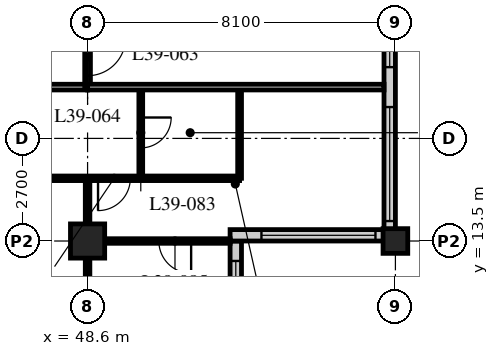
"""IFC4 building model, lengths in metres.
Left out: names, types, materials, properties, quantities, classifications, styles, units other than length and angle.
Written with IfcOpenShell. Run it as: python <this file> out.ifc"""

import sys

from ifc_helpers import new_model, si_unit, direction, frame, frame_2d, origin, origin_2d, place, context, subcontext, project, spatial, rectangle, hollow_rectangle, extrude, element, fill, save


model = new_model("IFC4")
c1 = context("Model", 3, precision=1e-05, world=origin(), true_north=direction((0.0, 1.0)))
c2 = subcontext(c1, "Body", "Model", "MODEL_VIEW")
j1 = project(units=[si_unit("LENGTHUNIT", "METRE"), si_unit("PLANEANGLEUNIT", "RADIAN")], contexts=[c1])
p1 = place(None, origin())
s1 = spatial("IfcSite", under=j1, at=p1, CompositionType="ELEMENT")
p2 = place(p1, origin())
s2 = spatial("IfcBuilding", under=s1, at=p2, CompositionType="ELEMENT")
p3 = place(p2, frame((0.0, 0.0, 151.0)))
s3 = spatial("IfcBuildingStorey", under=s2, at=p3, CompositionType="ELEMENT", Elevation=151.0)
p4 = place(p3, frame((48.6, 13.5, 0.0), z_axis=(0.0, 0.0, 1.0), x_axis=(1.0, 0.0, 0.0)))
e1 = element("IfcColumn", 1, at=p4, inside=s3, PredefinedType="COLUMN", context=c2, shape_type="SweptSolid", body=[
    extrude(hollow_rectangle(XDim=0.9, YDim=0.9, WallThickness=0.1, at=origin_2d()), origin(), (0.0, 0.0, 1.0), 3.4),
])
p5 = place(p3, frame((56.7, 13.5, 0.0), z_axis=(0.0, 0.0, 1.0), x_axis=(1.0, 0.0, 0.0)))
e2 = element("IfcColumn", 2, at=p5, inside=s3, PredefinedType="COLUMN", context=c2, shape_type="SweptSolid", body=[
    extrude(hollow_rectangle(XDim=0.65, YDim=0.65, WallThickness=0.055, at=origin_2d()), origin(), (0.0, 0.0, 1.0), 3.4),
])
p6 = place(p3, frame((52.5, 9.75, 0.0), z_axis=(0.0, 0.0, 1.0), x_axis=(0.0, 1.0, 0.0)))
e3 = element("IfcWall", 3, at=p6, inside=s3, PredefinedType="SOLIDWALL", context=c2, shape_type="SweptSolid", body=[
    extrude(rectangle(XDim=3.75, YDim=0.3, at=frame_2d((1.875, 0.0))), origin(), (0.0, 0.0, 1.0), 3.19),
])
p7 = place(p6, frame((0.225, 0.0, 0.9)))
e4 = element("IfcOpeningElement", 4, at=p7, cuts=e3, PredefinedType="OPENING", context=c2, shape_type="SweptSolid", body=[
    extrude(rectangle(XDim=3.0, YDim=1.4, at=frame_2d((1.5, 0.7))), frame((0.0, 0.16, 0.0), z_axis=(0.0, -1.0, 0.0), x_axis=(1.0, 0.0, 0.0)), (0.0, 0.0, 1.0), 0.32),
])
p8 = place(p3, frame((52.35, 13.65, 0.0), z_axis=(0.0, 0.0, 1.0), x_axis=(1.0, 0.0, 0.0)))
e5 = element("IfcWall", 5, at=p8, inside=s3, PredefinedType="SOLIDWALL", context=c2, shape_type="SweptSolid", body=[
    extrude(rectangle(XDim=4.35, YDim=0.3, at=frame_2d((2.175, 0.0))), origin(), (0.0, 0.0, 1.0), 3.19),
])
p9 = place(p8, frame((0.825, 0.0, 0.9)))
e6 = element("IfcOpeningElement", 6, at=p9, cuts=e5, PredefinedType="OPENING", context=c2, shape_type="SweptSolid", body=[
    extrude(rectangle(XDim=3.0, YDim=1.4, at=frame_2d((1.5, 0.7))), frame((0.0, 0.16, 0.0), z_axis=(0.0, -1.0, 0.0), x_axis=(1.0, 0.0, 0.0)), (0.0, 0.0, 1.0), 0.32),
])
p10 = place(p3, frame((56.55, 13.8, 0.0), z_axis=(0.0, 0.0, 1.0), x_axis=(0.0, 1.0, 0.0)))
e7 = element("IfcWall", 7, at=p10, inside=s3, PredefinedType="SOLIDWALL", context=c2, shape_type="SweptSolid", body=[
    extrude(rectangle(XDim=32.1, YDim=0.3, at=frame_2d((16.05, 0.0))), origin(), (0.0, 0.0, 1.0), 3.19),
])
p11 = place(p10, frame((0.225, 0.0, 0.9)))
e8 = element("IfcOpeningElement", 8, at=p11, cuts=e7, PredefinedType="OPENING", context=c2, shape_type="SweptSolid", body=[
    extrude(rectangle(XDim=3.0, YDim=1.4, at=frame_2d((1.5, 0.7))), frame((0.0, 0.16, 0.0), z_axis=(0.0, -1.0, 0.0), x_axis=(1.0, 0.0, 0.0)), (0.0, 0.0, 1.0), 0.32),
])
p12 = place(p10, frame((4.275, 0.0, 0.9)))
e9 = element("IfcOpeningElement", 9, at=p12, cuts=e7, PredefinedType="OPENING", context=c2, shape_type="SweptSolid", body=[
    extrude(rectangle(XDim=3.0, YDim=1.4, at=frame_2d((1.5, 0.7))), frame((0.0, 0.16, 0.0), z_axis=(0.0, -1.0, 0.0), x_axis=(1.0, 0.0, 0.0)), (0.0, 0.0, 1.0), 0.32),
])
p13 = place(p10, frame((8.325, 0.0, 0.9)))
e10 = element("IfcOpeningElement", 10, at=p13, cuts=e7, PredefinedType="OPENING", context=c2, shape_type="SweptSolid", body=[
    extrude(rectangle(XDim=3.0, YDim=1.4, at=frame_2d((1.5, 0.7))), frame((0.0, 0.16, 0.0), z_axis=(0.0, -1.0, 0.0), x_axis=(1.0, 0.0, 0.0)), (0.0, 0.0, 1.0), 0.32),
])
p14 = place(p10, frame((12.375, 0.0, 0.9)))
e11 = element("IfcOpeningElement", 11, at=p14, cuts=e7, PredefinedType="OPENING", context=c2, shape_type="SweptSolid", body=[
    extrude(rectangle(XDim=3.0, YDim=1.4, at=frame_2d((1.5, 0.7))), frame((0.0, 0.16, 0.0), z_axis=(0.0, -1.0, 0.0), x_axis=(1.0, 0.0, 0.0)), (0.0, 0.0, 1.0), 0.32),
])
p15 = place(p10, frame((16.425, 0.0, 0.9)))
e12 = element("IfcOpeningElement", 12, at=p15, cuts=e7, PredefinedType="OPENING", context=c2, shape_type="SweptSolid", body=[
    extrude(rectangle(XDim=3.0, YDim=1.4, at=frame_2d((1.5, 0.7))), frame((0.0, 0.16, 0.0), z_axis=(0.0, -1.0, 0.0), x_axis=(1.0, 0.0, 0.0)), (0.0, 0.0, 1.0), 0.32),
])
p16 = place(p10, frame((20.475, 0.0, 0.9)))
e13 = element("IfcOpeningElement", 13, at=p16, cuts=e7, PredefinedType="OPENING", context=c2, shape_type="SweptSolid", body=[
    extrude(rectangle(XDim=3.0, YDim=1.4, at=frame_2d((1.5, 0.7))), frame((0.0, 0.16, 0.0), z_axis=(0.0, -1.0, 0.0), x_axis=(1.0, 0.0, 0.0)), (0.0, 0.0, 1.0), 0.32),
])
p17 = place(p10, frame((24.525, 0.0, 0.9)))
e14 = element("IfcOpeningElement", 14, at=p17, cuts=e7, PredefinedType="OPENING", context=c2, shape_type="SweptSolid", body=[
    extrude(rectangle(XDim=3.0, YDim=1.4, at=frame_2d((1.5, 0.7))), frame((0.0, 0.16, 0.0), z_axis=(0.0, -1.0, 0.0), x_axis=(1.0, 0.0, 0.0)), (0.0, 0.0, 1.0), 0.32),
])
p18 = place(p10, frame((28.575, 0.0, 0.9)))
e15 = element("IfcOpeningElement", 15, at=p18, cuts=e7, PredefinedType="OPENING", context=c2, shape_type="SweptSolid", body=[
    extrude(rectangle(XDim=3.0, YDim=1.4, at=frame_2d((1.5, 0.7))), frame((0.0, 0.16, 0.0), z_axis=(0.0, -1.0, 0.0), x_axis=(1.0, 0.0, 0.0)), (0.0, 0.0, 1.0), 0.32),
])
p19 = place(p3, frame((8.1, 17.55, 0.0), z_axis=(0.0, 0.0, 1.0), x_axis=(1.0, 0.0, 0.0)))
e16 = element("IfcWall", 16, at=p19, inside=s3, PredefinedType="PARTITIONING", context=c2, shape_type="SweptSolid", body=[
    extrude(rectangle(XDim=40.5, YDim=0.15, at=frame_2d((20.25, 0.0))), origin(), (0.0, 0.0, 1.0), 3.19),
])
p20 = place(p19, frame((10.0, 0.0, 0.0)))
e17 = element("IfcOpeningElement", 17, at=p20, cuts=e16, PredefinedType="OPENING", context=c2, shape_type="SweptSolid", body=[
    extrude(rectangle(XDim=1.0, YDim=2.1, at=frame_2d((0.5, 1.05))), frame((0.0, 0.085, 0.0), z_axis=(0.0, -1.0, 0.0), x_axis=(1.0, 0.0, 0.0)), (0.0, 0.0, 1.0), 0.17),
])
p21 = place(p19, frame((22.15, 0.0, 0.0)))
e18 = element("IfcOpeningElement", 18, at=p21, cuts=e16, PredefinedType="OPENING", context=c2, shape_type="SweptSolid", body=[
    extrude(rectangle(XDim=1.0, YDim=2.1, at=frame_2d((0.5, 1.05))), frame((0.0, 0.085, 0.0), z_axis=(0.0, -1.0, 0.0), x_axis=(1.0, 0.0, 0.0)), (0.0, 0.0, 1.0), 0.17),
])
p22 = place(p19, frame((30.8, 0.0, 0.0)))
e19 = element("IfcOpeningElement", 19, at=p22, cuts=e16, PredefinedType="OPENING", context=c2, shape_type="SweptSolid", body=[
    extrude(rectangle(XDim=1.0, YDim=2.1, at=frame_2d((0.5, 1.05))), frame((0.0, 0.085, 0.0), z_axis=(0.0, -1.0, 0.0), x_axis=(1.0, 0.0, 0.0)), (0.0, 0.0, 1.0), 0.17),
])
p23 = place(p19, frame((34.85, 0.0, 0.0)))
e20 = element("IfcOpeningElement", 20, at=p23, cuts=e16, PredefinedType="OPENING", context=c2, shape_type="SweptSolid", body=[
    extrude(rectangle(XDim=1.0, YDim=2.1, at=frame_2d((0.5, 1.05))), frame((0.0, 0.085, 0.0), z_axis=(0.0, -1.0, 0.0), x_axis=(1.0, 0.0, 0.0)), (0.0, 0.0, 1.0), 0.17),
])
p24 = place(p19, frame((1.525, 0.0, 0.0)))
e21 = element("IfcOpeningElement", 21, at=p24, cuts=e16, PredefinedType="OPENING", context=c2, shape_type="SweptSolid", body=[
    extrude(rectangle(XDim=1.0, YDim=2.1, at=frame_2d((0.5, 1.05))), frame((0.0, 0.085, 0.0), z_axis=(0.0, -1.0, 0.0), x_axis=(1.0, 0.0, 0.0)), (0.0, 0.0, 1.0), 0.17),
])
p25 = place(p19, frame((37.975, 0.0, 0.0)))
e22 = element("IfcOpeningElement", 22, at=p25, cuts=e16, PredefinedType="OPENING", context=c2, shape_type="SweptSolid", body=[
    extrude(rectangle(XDim=1.0, YDim=2.1, at=frame_2d((0.5, 1.05))), frame((0.0, 0.085, 0.0), z_axis=(0.0, -1.0, 0.0), x_axis=(1.0, 0.0, 0.0)), (0.0, 0.0, 1.0), 0.17),
])
p26 = place(p3, frame((48.6, 17.55, 0.0), z_axis=(0.0, 0.0, 1.0), x_axis=(0.0, 1.0, 0.0)))
e23 = element("IfcWall", 23, at=p26, inside=s3, PredefinedType="PARTITIONING", context=c2, shape_type="SweptSolid", body=[
    extrude(rectangle(XDim=28.35, YDim=0.15, at=frame_2d((14.175, 0.0))), origin(), (0.0, 0.0, 1.0), 2.42),
])
p27 = place(p26, frame((0.3, 0.0, 0.0)))
e24 = element("IfcOpeningElement", 24, at=p27, cuts=e23, PredefinedType="OPENING", context=c2, shape_type="SweptSolid", body=[
    extrude(rectangle(XDim=1.0, YDim=2.1, at=frame_2d((0.5, 1.05))), frame((0.0, 0.085, 0.0), z_axis=(0.0, -1.0, 0.0), x_axis=(1.0, 0.0, 0.0)), (0.0, 0.0, 1.0), 0.17),
])
p28 = place(p26, frame((6.5, 0.0, 0.0)))
e25 = element("IfcOpeningElement", 25, at=p28, cuts=e23, PredefinedType="OPENING", context=c2, shape_type="SweptSolid", body=[
    extrude(rectangle(XDim=1.0, YDim=2.1, at=frame_2d((0.5, 1.05))), frame((0.0, 0.085, 0.0), z_axis=(0.0, -1.0, 0.0), x_axis=(1.0, 0.0, 0.0)), (0.0, 0.0, 1.0), 0.17),
])
p29 = place(p26, frame((13.675, 0.0, 0.0)))
e26 = element("IfcOpeningElement", 26, at=p29, cuts=e23, PredefinedType="OPENING", context=c2, shape_type="SweptSolid", body=[
    extrude(rectangle(XDim=1.0, YDim=2.1, at=frame_2d((0.5, 1.05))), frame((0.0, 0.085, 0.0), z_axis=(0.0, -1.0, 0.0), x_axis=(1.0, 0.0, 0.0)), (0.0, 0.0, 1.0), 0.17),
])
p30 = place(p26, frame((22.7, 0.0, 0.0)))
e27 = element("IfcOpeningElement", 27, at=p30, cuts=e23, PredefinedType="OPENING", context=c2, shape_type="SweptSolid", body=[
    extrude(rectangle(XDim=1.0, YDim=2.1, at=frame_2d((0.5, 1.05))), frame((0.0, 0.085, 0.0), z_axis=(0.0, -1.0, 0.0), x_axis=(1.0, 0.0, 0.0)), (0.0, 0.0, 1.0), 0.17),
])
p31 = place(p26, frame((24.9, 0.0, 0.0)))
e28 = element("IfcOpeningElement", 28, at=p31, cuts=e23, PredefinedType="OPENING", context=c2, shape_type="SweptSolid", body=[
    extrude(rectangle(XDim=1.0, YDim=2.1, at=frame_2d((0.5, 1.05))), frame((0.0, 0.085, 0.0), z_axis=(0.0, -1.0, 0.0), x_axis=(1.0, 0.0, 0.0)), (0.0, 0.0, 1.0), 0.17),
])
p32 = place(p3, frame((44.55, 15.15, 0.0), z_axis=(0.0, 0.0, 1.0), x_axis=(1.0, 0.0, 0.0)))
e29 = element("IfcWall", 29, at=p32, inside=s3, PredefinedType="PARTITIONING", context=c2, shape_type="SweptSolid", body=[
    extrude(rectangle(XDim=8.05, YDim=0.12, at=frame_2d((4.025, 0.0))), origin(), (0.0, 0.0, 1.0), 3.19),
])
p33 = place(p32, frame((0.475, 0.0, 0.0)))
e30 = element("IfcOpeningElement", 30, at=p33, cuts=e29, PredefinedType="OPENING", context=c2, shape_type="SweptSolid", body=[
    extrude(rectangle(XDim=0.85, YDim=2.1, at=frame_2d((0.425, 1.05))), frame((0.0, 0.07, 0.0), z_axis=(0.0, -1.0, 0.0), x_axis=(1.0, 0.0, 0.0)), (0.0, 0.0, 1.0), 0.14),
])
p34 = place(p32, frame((4.325, 0.0, 0.0)))
e31 = element("IfcOpeningElement", 31, at=p34, cuts=e29, PredefinedType="OPENING", context=c2, shape_type="SweptSolid", body=[
    extrude(rectangle(XDim=0.85, YDim=2.1, at=frame_2d((0.425, 1.05))), frame((0.0, 0.07, 0.0), z_axis=(0.0, -1.0, 0.0), x_axis=(1.0, 0.0, 0.0)), (0.0, 0.0, 1.0), 0.14),
])
p35 = place(p3, frame((50.0, 17.55, 0.0), z_axis=(0.0, 0.0, 1.0), x_axis=(0.0, -1.0, 0.0)))
e32 = element("IfcWall", 32, at=p35, inside=s3, PredefinedType="PARTITIONING", context=c2, shape_type="SweptSolid", body=[
    extrude(rectangle(XDim=2.4, YDim=0.1, at=frame_2d((1.2, 0.0))), origin(), (0.0, 0.0, 1.0), 3.19),
])
p36 = place(p35, frame((0.8, 0.0, 0.0)))
e33 = element("IfcOpeningElement", 33, at=p36, cuts=e32, PredefinedType="OPENING", context=c2, shape_type="SweptSolid", body=[
    extrude(rectangle(XDim=0.8, YDim=2.1, at=frame_2d((0.4, 1.05))), frame((0.0, 0.06, 0.0), z_axis=(0.0, -1.0, 0.0), x_axis=(1.0, 0.0, 0.0)), (0.0, 0.0, 1.0), 0.12),
])
p37 = place(p3, frame((52.6, 17.55, 0.0), z_axis=(0.0, 0.0, 1.0), x_axis=(0.0, -1.0, 0.0)))
e34 = element("IfcWall", 34, at=p37, inside=s3, PredefinedType="PARTITIONING", context=c2, shape_type="SweptSolid", body=[
    extrude(rectangle(XDim=2.4, YDim=0.1, at=frame_2d((1.2, 0.0))), origin(), (0.0, 0.0, 1.0), 3.19),
])
p38 = place(p3, frame((48.6, 15.15, 0.0), z_axis=(0.0, 0.0, 1.0), x_axis=(0.0, -1.0, 0.0)))
e35 = element("IfcWall", 35, at=p38, inside=s3, PredefinedType="PARTITIONING", context=c2, shape_type="SweptSolid", body=[
    extrude(rectangle(XDim=5.4, YDim=0.12, at=frame_2d((2.7, 0.0))), origin(), (0.0, 0.0, 1.0), 2.42),
])
p39 = place(p3, frame((48.6, 13.5, 0.0), z_axis=(0.0, 0.0, 1.0), x_axis=(1.0, 0.0, 0.0)))
e36 = element("IfcWall", 36, at=p39, inside=s3, PredefinedType="PARTITIONING", context=c2, shape_type="SweptSolid", body=[
    extrude(rectangle(XDim=3.75, YDim=0.12, at=frame_2d((1.875, 0.0))), origin(), (0.0, 0.0, 1.0), 2.42),
])
p40 = place(p39, frame((1.875, 0.0, 0.0)))
e37 = element("IfcOpeningElement", 37, at=p40, cuts=e36, PredefinedType="OPENING", context=c2, shape_type="SweptSolid", body=[
    extrude(rectangle(XDim=0.85, YDim=2.1, at=frame_2d((0.425, 1.05))), frame((0.0, 0.07, 0.0), z_axis=(0.0, -1.0, 0.0), x_axis=(1.0, 0.0, 0.0)), (0.0, 0.0, 1.0), 0.14),
])
p41 = place(p3, frame((48.6, 17.55, 0.0), z_axis=(0.0, 0.0, 1.0), x_axis=(1.0, 0.0, 0.0)))
e38 = element("IfcWall", 38, at=p41, inside=s3, PredefinedType="PARTITIONING", context=c2, shape_type="SweptSolid", body=[
    extrude(rectangle(XDim=7.8, YDim=0.15, at=frame_2d((3.9, 0.0))), origin(), (0.0, 0.0, 1.0), 3.19),
])
p42 = place(p7, origin())
e39 = element("IfcWindow", 39, at=p42, inside=s3, PartitioningType="SINGLE_PANEL", PredefinedType="WINDOW", context=c2, shape_type="SweptSolid", body=[
    extrude(rectangle(XDim=3.0, YDim=1.4, at=frame_2d((1.5, 0.7))), frame((0.0, 0.03, 0.0), z_axis=(0.0, -1.0, 0.0), x_axis=(1.0, 0.0, 0.0)), (0.0, 0.0, 1.0), 0.06),
])
fill(e4, e39)
p43 = place(p9, origin())
e40 = element("IfcWindow", 40, at=p43, inside=s3, PartitioningType="SINGLE_PANEL", PredefinedType="WINDOW", context=c2, shape_type="SweptSolid", body=[
    extrude(rectangle(XDim=3.0, YDim=1.4, at=frame_2d((1.5, 0.7))), frame((0.0, 0.03, 0.0), z_axis=(0.0, -1.0, 0.0), x_axis=(1.0, 0.0, 0.0)), (0.0, 0.0, 1.0), 0.06),
])
fill(e6, e40)
p44 = place(p11, origin())
e41 = element("IfcWindow", 41, at=p44, inside=s3, PartitioningType="SINGLE_PANEL", PredefinedType="WINDOW", context=c2, shape_type="SweptSolid", body=[
    extrude(rectangle(XDim=3.0, YDim=1.4, at=frame_2d((1.5, 0.7))), frame((0.0, 0.03, 0.0), z_axis=(0.0, -1.0, 0.0), x_axis=(1.0, 0.0, 0.0)), (0.0, 0.0, 1.0), 0.06),
])
fill(e8, e41)
p45 = place(p12, origin())
e42 = element("IfcWindow", 42, at=p45, inside=s3, PartitioningType="SINGLE_PANEL", PredefinedType="WINDOW", context=c2, shape_type="SweptSolid", body=[
    extrude(rectangle(XDim=3.0, YDim=1.4, at=frame_2d((1.5, 0.7))), frame((0.0, 0.03, 0.0), z_axis=(0.0, -1.0, 0.0), x_axis=(1.0, 0.0, 0.0)), (0.0, 0.0, 1.0), 0.06),
])
fill(e9, e42)
p46 = place(p27, origin())
e43 = element("IfcDoor", 43, at=p46, inside=s3, OperationType="SINGLE_SWING_LEFT", PredefinedType="DOOR", context=c2, shape_type="SweptSolid", body=[
    extrude(rectangle(XDim=1.0, YDim=2.1, at=frame_2d((0.5, 1.05))), frame((0.0, 0.025, 0.0), z_axis=(0.0, -1.0, 0.0), x_axis=(1.0, 0.0, 0.0)), (0.0, 0.0, 1.0), 0.05),
])
fill(e24, e43)
p47 = place(p36, origin())
e44 = element("IfcDoor", 44, at=p47, inside=s3, OperationType="SINGLE_SWING_LEFT", PredefinedType="DOOR", context=c2, shape_type="SweptSolid", body=[
    extrude(rectangle(XDim=0.8, YDim=2.1, at=frame_2d((0.4, 1.05))), frame((0.0, 0.025, 0.0), z_axis=(0.0, -1.0, 0.0), x_axis=(1.0, 0.0, 0.0)), (0.0, 0.0, 1.0), 0.05),
])
fill(e33, e44)
p48 = place(p34, origin())
e45 = element("IfcDoor", 45, at=p48, inside=s3, OperationType="SINGLE_SWING_RIGHT", PredefinedType="DOOR", context=c2, shape_type="SweptSolid", body=[
    extrude(rectangle(XDim=0.85, YDim=2.1, at=frame_2d((0.425, 1.05))), frame((0.0, 0.025, 0.0), z_axis=(0.0, -1.0, 0.0), x_axis=(1.0, 0.0, 0.0)), (0.0, 0.0, 1.0), 0.05),
])
fill(e31, e45)
p49 = place(p40, origin())
e46 = element("IfcDoor", 46, at=p49, inside=s3, OperationType="SINGLE_SWING_LEFT", PredefinedType="DOOR", context=c2, shape_type="SweptSolid", body=[
    extrude(rectangle(XDim=0.85, YDim=2.1, at=frame_2d((0.425, 1.05))), frame((0.0, 0.025, 0.0), z_axis=(0.0, -1.0, 0.0), x_axis=(1.0, 0.0, 0.0)), (0.0, 0.0, 1.0), 0.05),
])
fill(e37, e46)
save(model, sys.argv[1])
